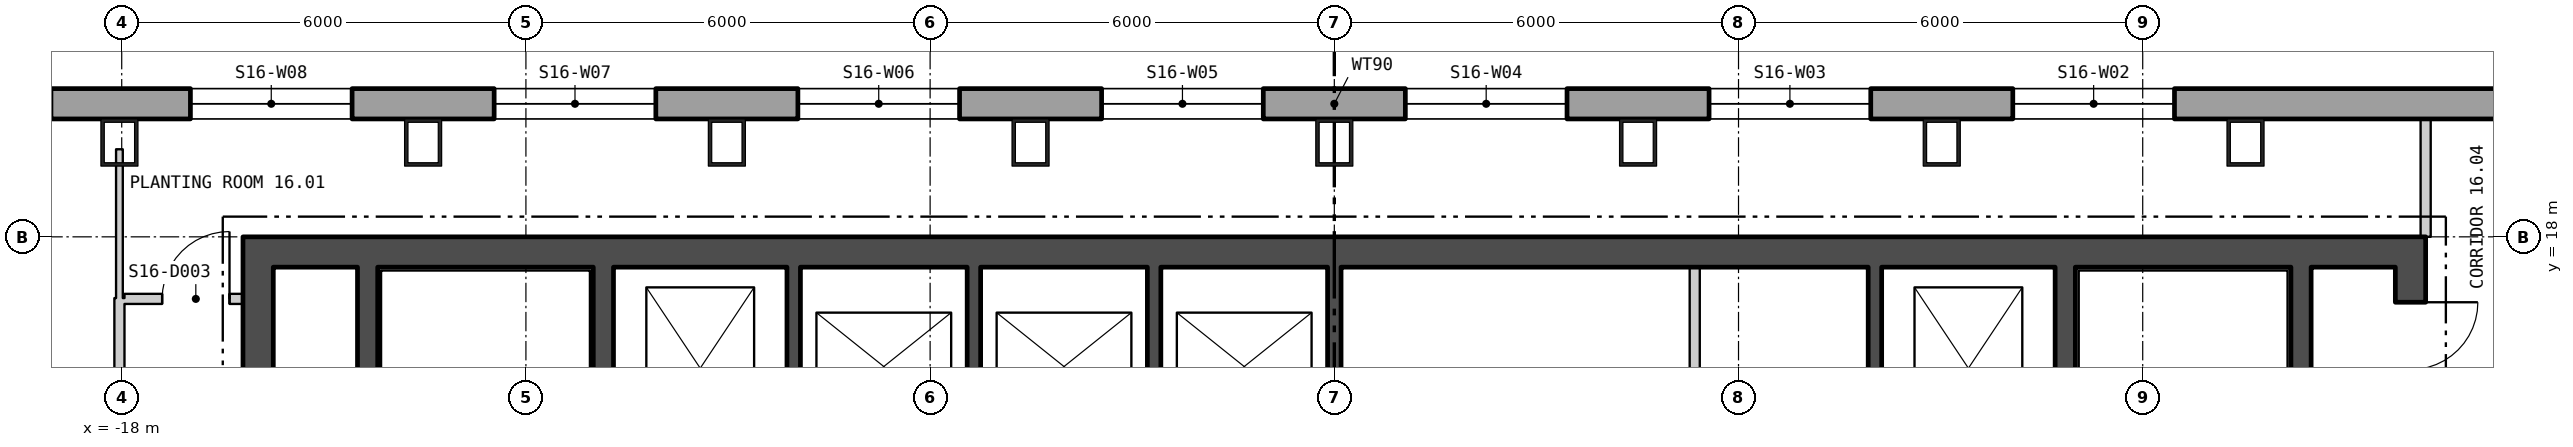
"""IFC4 building model, lengths in metres.
Left out: names, types, materials, properties, quantities, classifications, styles, units other than length and angle.
Written with IfcOpenShell. Run it as: python <this file> out.ifc"""

import sys

from ifc_helpers import new_model, si_unit, direction, frame, frame_2d, origin, origin_2d, place, context, subcontext, project, spatial, polyline, rectangle, hollow_rectangle, outline, extrude, element, fill, save


model = new_model("IFC4")
c1 = context("Model", 3, precision=1e-05, world=origin(), true_north=direction((0.0, 1.0)))
c2 = subcontext(c1, "Body", "Model", "MODEL_VIEW")
j1 = project(units=[si_unit("LENGTHUNIT", "METRE"), si_unit("PLANEANGLEUNIT", "RADIAN")], contexts=[c1])
p1 = place(None, origin())
s1 = spatial("IfcSite", under=j1, at=p1, CompositionType="ELEMENT")
p2 = place(p1, origin())
s2 = spatial("IfcBuilding", under=s1, at=p2, CompositionType="ELEMENT")
p3 = place(p2, frame((0.0, 0.0, 216.0)))
s3 = spatial("IfcBuildingStorey", under=s2, at=p3, CompositionType="ELEMENT", Elevation=216.0)
for number, where, z_axis, x_axis in (
    (1, (13.526, 19.4, 0.0), (0.0, 0.0, 1.0), (-1.0, 0.0, 0.0)),
    (2, (9.017, 19.4, 0.0), (0.0, 0.0, 1.0), (-1.0, 0.0, 0.0)),
    (3, (4.509, 19.4, 0.0), (0.0, 0.0, 1.0), (-1.0, 0.0, 0.0)),
    (4, (0.0, 19.4, 0.0), (0.0, 0.0, 1.0), (-1.0, 0.0, 0.0)),
    (5, (-4.509, 19.4, 0.0), (0.0, 0.0, 1.0), (-1.0, 0.0, 0.0)),
    (6, (-9.017, 19.4, 0.0), (0.0, 0.0, 1.0), (-1.0, 0.0, 0.0)),
    (7, (-13.526, 19.4, 0.0), (0.0, 0.0, 1.0), (-1.0, 0.0, 0.0)),
    (8, (-18.034, 19.4, 0.0), (0.0, 0.0, 1.0), (-1.0, 0.0, 0.0)),
):
    element("IfcColumn", number, at=place(p3, frame(where, z_axis=z_axis, x_axis=x_axis)), inside=s3, PredefinedType="COLUMN", context=c2, shape_type="SweptSolid", body=[
        extrude(hollow_rectangle(XDim=0.55, YDim=0.7, WallThickness=0.05, at=origin_2d()), origin(), (0.0, 0.0, 1.0), 3.9),
    ])
p4 = place(p3, frame((22.875, 19.975, -0.4), z_axis=(0.0, 0.0, 1.0), x_axis=(-1.0, 0.0, 0.0)))
e9 = element("IfcWall", 9, at=p4, inside=s3, PredefinedType="SOLIDWALL", context=c2, shape_type="SweptSolid", body=[
    extrude(outline(polyline([(-0.13, -0.225), (45.88, -0.225), (45.62, 0.225), (0.13, 0.225), (-0.13, -0.225)])), origin(), (0.0, 0.0, 1.0), 3.9),
])
p5 = place(p4, frame((1.425, 0.0, 1.3)))
e10 = element("IfcOpeningElement", 10, at=p5, cuts=e9, PredefinedType="OPENING", context=c2, shape_type="SweptSolid", body=[
    extrude(rectangle(XDim=2.4, YDim=2.0, at=frame_2d((1.2, 1.0))), frame((0.0, 0.235, 0.0), z_axis=(0.0, -1.0, 0.0), x_axis=(1.0, 0.0, 0.0)), (0.0, 0.0, 1.0), 0.47),
])
p6 = place(p4, frame((10.403, 0.0, 1.3)))
e11 = element("IfcOpeningElement", 11, at=p6, cuts=e9, PredefinedType="OPENING", context=c2, shape_type="SweptSolid", body=[
    extrude(rectangle(XDim=2.4, YDim=2.0, at=frame_2d((1.2, 1.0))), frame((0.0, 0.235, 0.0), z_axis=(0.0, -1.0, 0.0), x_axis=(1.0, 0.0, 0.0)), (0.0, 0.0, 1.0), 0.47),
])
p7 = place(p4, frame((14.912, 0.0, 1.3)))
e12 = element("IfcOpeningElement", 12, at=p7, cuts=e9, PredefinedType="OPENING", context=c2, shape_type="SweptSolid", body=[
    extrude(rectangle(XDim=2.4, YDim=2.0, at=frame_2d((1.2, 1.0))), frame((0.0, 0.235, 0.0), z_axis=(0.0, -1.0, 0.0), x_axis=(1.0, 0.0, 0.0)), (0.0, 0.0, 1.0), 0.47),
])
p8 = place(p4, frame((19.421, 0.0, 1.3)))
e13 = element("IfcOpeningElement", 13, at=p8, cuts=e9, PredefinedType="OPENING", context=c2, shape_type="SweptSolid", body=[
    extrude(rectangle(XDim=2.4, YDim=2.0, at=frame_2d((1.2, 1.0))), frame((0.0, 0.235, 0.0), z_axis=(0.0, -1.0, 0.0), x_axis=(1.0, 0.0, 0.0)), (0.0, 0.0, 1.0), 0.47),
])
p9 = place(p4, frame((23.929, 0.0, 1.3)))
e14 = element("IfcOpeningElement", 14, at=p9, cuts=e9, PredefinedType="OPENING", context=c2, shape_type="SweptSolid", body=[
    extrude(rectangle(XDim=2.4, YDim=2.0, at=frame_2d((1.2, 1.0))), frame((0.0, 0.235, 0.0), z_axis=(0.0, -1.0, 0.0), x_axis=(1.0, 0.0, 0.0)), (0.0, 0.0, 1.0), 0.47),
])
p10 = place(p4, frame((28.438, 0.0, 1.3)))
e15 = element("IfcOpeningElement", 15, at=p10, cuts=e9, PredefinedType="OPENING", context=c2, shape_type="SweptSolid", body=[
    extrude(rectangle(XDim=2.4, YDim=2.0, at=frame_2d((1.2, 1.0))), frame((0.0, 0.235, 0.0), z_axis=(0.0, -1.0, 0.0), x_axis=(1.0, 0.0, 0.0)), (0.0, 0.0, 1.0), 0.47),
])
p11 = place(p4, frame((32.947, 0.0, 1.3)))
e16 = element("IfcOpeningElement", 16, at=p11, cuts=e9, PredefinedType="OPENING", context=c2, shape_type="SweptSolid", body=[
    extrude(rectangle(XDim=2.4, YDim=2.0, at=frame_2d((1.2, 1.0))), frame((0.0, 0.235, 0.0), z_axis=(0.0, -1.0, 0.0), x_axis=(1.0, 0.0, 0.0)), (0.0, 0.0, 1.0), 0.47),
])
p12 = place(p4, frame((37.455, 0.0, 1.3)))
e17 = element("IfcOpeningElement", 17, at=p12, cuts=e9, PredefinedType="OPENING", context=c2, shape_type="SweptSolid", body=[
    extrude(rectangle(XDim=2.4, YDim=2.0, at=frame_2d((1.2, 1.0))), frame((0.0, 0.235, 0.0), z_axis=(0.0, -1.0, 0.0), x_axis=(1.0, 0.0, 0.0)), (0.0, 0.0, 1.0), 0.47),
])
p13 = place(p4, frame((41.925, 0.0, 1.3)))
e18 = element("IfcOpeningElement", 18, at=p13, cuts=e9, PredefinedType="OPENING", context=c2, shape_type="SweptSolid", body=[
    extrude(rectangle(XDim=2.4, YDim=2.0, at=frame_2d((1.2, 1.0))), frame((0.0, 0.235, 0.0), z_axis=(0.0, -1.0, 0.0), x_axis=(1.0, 0.0, 0.0)), (0.0, 0.0, 1.0), 0.47),
])
p14 = place(p3, frame((-16.2, 17.775, 0.0), z_axis=(0.0, 0.0, 1.0), x_axis=(1.0, 0.0, 0.0)))
e19 = element("IfcWall", 19, at=p14, inside=s3, PredefinedType="SHEAR", context=c2, shape_type="SweptSolid", body=[
    extrude(rectangle(XDim=32.4, YDim=0.45, at=frame_2d((16.2, 0.0))), origin(), (0.0, 0.0, 1.0), 3.7),
])
p15 = place(p3, frame((-15.975, 2.45, 0.0), z_axis=(0.0, 0.0, 1.0), x_axis=(0.0, 1.0, 0.0)))
e20 = element("IfcWall", 20, at=p15, inside=s3, PredefinedType="SHEAR", context=c2, shape_type="SweptSolid", body=[
    extrude(rectangle(XDim=15.1, YDim=0.45, at=frame_2d((7.55, 0.0))), origin(), (0.0, 0.0, 1.0), 3.7),
])
p16 = place(p15, frame((4.4, 0.0, 0.0)))
e21 = element("IfcOpeningElement", 21, at=p16, cuts=e20, PredefinedType="OPENING", context=c2, shape_type="SweptSolid", body=[
    extrude(rectangle(XDim=1.5, YDim=2.1, at=frame_2d((0.75, 1.05))), frame((0.0, 0.235, 0.0), z_axis=(0.0, -1.0, 0.0), x_axis=(1.0, 0.0, 0.0)), (0.0, 0.0, 1.0), 0.47),
])
p17 = place(p15, frame((0.4, 0.0, 0.0)))
e22 = element("IfcOpeningElement", 22, at=p17, cuts=e20, PredefinedType="OPENING", context=c2, shape_type="SweptSolid", body=[
    extrude(rectangle(XDim=0.9, YDim=2.1, at=frame_2d((0.45, 1.05))), frame((0.0, 0.235, 0.0), z_axis=(0.0, -1.0, 0.0), x_axis=(1.0, 0.0, 0.0)), (0.0, 0.0, 1.0), 0.47),
])
p18 = place(p15, frame((2.5, 0.0, 0.0)))
e23 = element("IfcOpeningElement", 23, at=p18, cuts=e20, PredefinedType="OPENING", context=c2, shape_type="SweptSolid", body=[
    extrude(rectangle(XDim=0.9, YDim=2.1, at=frame_2d((0.45, 1.05))), frame((0.0, 0.235, 0.0), z_axis=(0.0, -1.0, 0.0), x_axis=(1.0, 0.0, 0.0)), (0.0, 0.0, 1.0), 0.47),
])
p19 = place(p15, frame((6.475, 0.0, 0.0)))
e24 = element("IfcOpeningElement", 24, at=p19, cuts=e20, PredefinedType="OPENING", context=c2, shape_type="SweptSolid", body=[
    extrude(rectangle(XDim=1.0, YDim=2.1, at=frame_2d((0.5, 1.05))), frame((0.0, 0.235, 0.0), z_axis=(0.0, -1.0, 0.0), x_axis=(1.0, 0.0, 0.0)), (0.0, 0.0, 1.0), 0.47),
])
p20 = place(p15, frame((11.125, 0.0, 0.0)))
e25 = element("IfcOpeningElement", 25, at=p20, cuts=e20, PredefinedType="OPENING", context=c2, shape_type="SweptSolid", body=[
    extrude(rectangle(XDim=0.9, YDim=2.1, at=frame_2d((0.45, 1.05))), frame((0.0, 0.235, 0.0), z_axis=(0.0, -1.0, 0.0), x_axis=(1.0, 0.0, 0.0)), (0.0, 0.0, 1.0), 0.47),
])
p21 = place(p3, frame((15.975, 2.45, 0.0), z_axis=(0.0, 0.0, 1.0), x_axis=(0.0, 1.0, 0.0)))
e26 = element("IfcWall", 26, at=p21, inside=s3, PredefinedType="SHEAR", context=c2, shape_type="SweptSolid", body=[
    extrude(rectangle(XDim=15.1, YDim=0.45, at=frame_2d((7.55, 0.0))), origin(), (0.0, 0.0, 1.0), 3.7),
])
p22 = place(p21, frame((4.4, 0.0, 0.0)))
e27 = element("IfcOpeningElement", 27, at=p22, cuts=e26, PredefinedType="OPENING", context=c2, shape_type="SweptSolid", body=[
    extrude(rectangle(XDim=1.5, YDim=2.1, at=frame_2d((0.75, 1.05))), frame((0.0, 0.235, 0.0), z_axis=(0.0, -1.0, 0.0), x_axis=(1.0, 0.0, 0.0)), (0.0, 0.0, 1.0), 0.47),
])
p23 = place(p21, frame((0.85, 0.0, 0.0)))
e28 = element("IfcOpeningElement", 28, at=p23, cuts=e26, PredefinedType="OPENING", context=c2, shape_type="SweptSolid", body=[
    extrude(rectangle(XDim=0.9, YDim=2.1, at=frame_2d((0.45, 1.05))), frame((0.0, 0.235, 0.0), z_axis=(0.0, -1.0, 0.0), x_axis=(1.0, 0.0, 0.0)), (0.0, 0.0, 1.0), 0.47),
])
p24 = place(p21, frame((3.05, 0.0, 0.0)))
e29 = element("IfcOpeningElement", 29, at=p24, cuts=e26, PredefinedType="OPENING", context=c2, shape_type="SweptSolid", body=[
    extrude(rectangle(XDim=0.9, YDim=2.1, at=frame_2d((0.45, 1.05))), frame((0.0, 0.235, 0.0), z_axis=(0.0, -1.0, 0.0), x_axis=(1.0, 0.0, 0.0)), (0.0, 0.0, 1.0), 0.47),
])
p25 = place(p21, frame((9.029, 0.0, 0.0)))
e30 = element("IfcOpeningElement", 30, at=p25, cuts=e26, PredefinedType="OPENING", context=c2, shape_type="SweptSolid", body=[
    extrude(rectangle(XDim=0.9, YDim=2.1, at=frame_2d((0.45, 1.05))), frame((0.0, 0.235, 0.0), z_axis=(0.0, -1.0, 0.0), x_axis=(1.0, 0.0, 0.0)), (0.0, 0.0, 1.0), 0.47),
])
p26 = place(p21, frame((13.579, 0.0, 0.0)))
e31 = element("IfcOpeningElement", 31, at=p26, cuts=e26, PredefinedType="OPENING", context=c2, shape_type="SweptSolid", body=[
    extrude(rectangle(XDim=1.0, YDim=2.1, at=frame_2d((0.5, 1.05))), frame((0.0, 0.235, 0.0), z_axis=(0.0, -1.0, 0.0), x_axis=(1.0, 0.0, 0.0)), (0.0, 0.0, 1.0), 0.47),
])
p27 = place(p3, frame((-10.85, 2.45, 0.0), z_axis=(0.0, 0.0, 1.0), x_axis=(0.0, 1.0, 0.0)))
e32 = element("IfcWall", 32, at=p27, inside=s3, PredefinedType="SHEAR", context=c2, shape_type="SweptSolid", body=[
    extrude(rectangle(XDim=15.1, YDim=0.3, at=frame_2d((7.55, 0.0))), origin(), (0.0, 0.0, 1.0), 3.7),
])
p28 = place(p27, frame((3.525, 0.0, 0.0)))
e33 = element("IfcOpeningElement", 33, at=p28, cuts=e32, PredefinedType="OPENING", context=c2, shape_type="SweptSolid", body=[
    extrude(rectangle(XDim=1.25, YDim=2.1, at=frame_2d((0.625, 1.05))), frame((0.0, 0.16, 0.0), z_axis=(0.0, -1.0, 0.0), x_axis=(1.0, 0.0, 0.0)), (0.0, 0.0, 1.0), 0.32),
])
p29 = place(p27, frame((1.15, 0.0, 0.0)))
e34 = element("IfcOpeningElement", 34, at=p29, cuts=e32, PredefinedType="OPENING", context=c2, shape_type="SweptSolid", body=[
    extrude(rectangle(XDim=1.0, YDim=2.1, at=frame_2d((0.5, 1.05))), frame((0.0, 0.16, 0.0), z_axis=(0.0, -1.0, 0.0), x_axis=(1.0, 0.0, 0.0)), (0.0, 0.0, 1.0), 0.32),
])
p30 = place(p3, frame((-14.35, 2.45, 0.0), z_axis=(0.0, 0.0, 1.0), x_axis=(0.0, 1.0, 0.0)))
e35 = element("IfcWall", 35, at=p30, inside=s3, PredefinedType="SHEAR", context=c2, shape_type="SweptSolid", body=[
    extrude(rectangle(XDim=15.1, YDim=0.3, at=frame_2d((7.55, 0.0))), origin(), (0.0, 0.0, 1.0), 3.7),
])
p31 = place(p30, frame((4.4, 0.0, 0.0)))
e36 = element("IfcOpeningElement", 36, at=p31, cuts=e35, PredefinedType="OPENING", context=c2, shape_type="SweptSolid", body=[
    extrude(rectangle(XDim=1.5, YDim=2.1, at=frame_2d((0.75, 1.05))), frame((0.0, 0.16, 0.0), z_axis=(0.0, -1.0, 0.0), x_axis=(1.0, 0.0, 0.0)), (0.0, 0.0, 1.0), 0.32),
])
p32 = place(p3, frame((10.85, 2.45, 0.0), z_axis=(0.0, 0.0, 1.0), x_axis=(0.0, 1.0, 0.0)))
e37 = element("IfcWall", 37, at=p32, inside=s3, PredefinedType="SHEAR", context=c2, shape_type="SweptSolid", body=[
    extrude(rectangle(XDim=15.1, YDim=0.3, at=frame_2d((7.55, 0.0))), origin(), (0.0, 0.0, 1.0), 3.7),
])
p33 = place(p32, frame((3.525, 0.0, 0.0)))
e38 = element("IfcOpeningElement", 38, at=p33, cuts=e37, PredefinedType="OPENING", context=c2, shape_type="SweptSolid", body=[
    extrude(rectangle(XDim=1.25, YDim=2.1, at=frame_2d((0.625, 1.05))), frame((0.0, 0.16, 0.0), z_axis=(0.0, -1.0, 0.0), x_axis=(1.0, 0.0, 0.0)), (0.0, 0.0, 1.0), 0.32),
])
p34 = place(p32, frame((1.15, 0.0, 0.0)))
e39 = element("IfcOpeningElement", 39, at=p34, cuts=e37, PredefinedType="OPENING", context=c2, shape_type="SweptSolid", body=[
    extrude(rectangle(XDim=1.0, YDim=2.1, at=frame_2d((0.5, 1.05))), frame((0.0, 0.16, 0.0), z_axis=(0.0, -1.0, 0.0), x_axis=(1.0, 0.0, 0.0)), (0.0, 0.0, 1.0), 0.32),
])
p35 = place(p3, frame((14.35, 2.45, 0.0), z_axis=(0.0, 0.0, 1.0), x_axis=(0.0, 1.0, 0.0)))
e40 = element("IfcWall", 40, at=p35, inside=s3, PredefinedType="SHEAR", context=c2, shape_type="SweptSolid", body=[
    extrude(rectangle(XDim=15.1, YDim=0.3, at=frame_2d((7.55, 0.0))), origin(), (0.0, 0.0, 1.0), 3.7),
])
p36 = place(p35, frame((4.4, 0.0, 0.0)))
e41 = element("IfcOpeningElement", 41, at=p36, cuts=e40, PredefinedType="OPENING", context=c2, shape_type="SweptSolid", body=[
    extrude(rectangle(XDim=1.5, YDim=2.1, at=frame_2d((0.75, 1.05))), frame((0.0, 0.16, 0.0), z_axis=(0.0, -1.0, 0.0), x_axis=(1.0, 0.0, 0.0)), (0.0, 0.0, 1.0), 0.32),
])
for number, where, z_axis, x_axis in (
    (42, (-8.025, 14.7, 0.0), (0.0, 0.0, 1.0), (0.0, 1.0, 0.0)),
    (43, (-5.35, 14.7, 0.0), (0.0, 0.0, 1.0), (0.0, 1.0, 0.0)),
    (44, (-2.675, 14.7, 0.0), (0.0, 0.0, 1.0), (0.0, 1.0, 0.0)),
    (45, (0.0, 14.7, 0.0), (0.0, 0.0, 1.0), (0.0, 1.0, 0.0)),
):
    element("IfcWall", number, at=place(p3, frame(where, z_axis=z_axis, x_axis=x_axis)), inside=s3, PredefinedType="SHEAR", context=c2, shape_type="SweptSolid", body=[
        extrude(rectangle(XDim=2.85, YDim=0.2, at=frame_2d((1.425, 0.0))), origin(), (0.0, 0.0, 1.0), 3.7),
    ])
p37 = place(p3, frame((5.35, 14.7, 0.0), z_axis=(0.0, 0.0, 1.0), x_axis=(0.0, 1.0, 0.0)))
e46 = element("IfcWall", 46, at=p37, inside=s3, PredefinedType="PARTITIONING", context=c2, shape_type="SweptSolid", body=[
    extrude(rectangle(XDim=2.85, YDim=0.15, at=frame_2d((1.425, 0.0))), origin(), (0.0, 0.0, 1.0), 3.7),
])
p38 = place(p3, frame((8.025, 14.7, 0.0), z_axis=(0.0, 0.0, 1.0), x_axis=(0.0, 1.0, 0.0)))
e47 = element("IfcWall", 47, at=p38, inside=s3, PredefinedType="SHEAR", context=c2, shape_type="SweptSolid", body=[
    extrude(rectangle(XDim=2.85, YDim=0.2, at=frame_2d((1.425, 0.0))), origin(), (0.0, 0.0, 1.0), 3.7),
])
p39 = place(p3, frame((-18.034, 13.3, 0.0), z_axis=(0.0, 0.0, 1.0), x_axis=(0.0, 1.0, 0.0)))
e48 = element("IfcWall", 48, at=p39, inside=s3, PredefinedType="PARTITIONING", context=c2, shape_type="SweptSolid", body=[
    extrude(rectangle(XDim=3.791, YDim=0.15, at=frame_2d((1.895, 0.0))), origin(), (0.0, 0.0, 1.0), 3.7),
])
p40 = place(p39, frame((1.344, 0.0, 0.0)))
e49 = element("IfcOpeningElement", 49, at=p40, cuts=e48, PredefinedType="OPENING", context=c2, shape_type="SweptSolid", body=[
    extrude(rectangle(XDim=1.0, YDim=2.1, at=frame_2d((0.5, 1.05))), frame((0.0, 0.085, 0.0), z_axis=(0.0, -1.0, 0.0), x_axis=(1.0, 0.0, 0.0)), (0.0, 0.0, 1.0), 0.17),
])
p41 = place(p3, frame((-18.034, 17.091, 0.0), z_axis=(0.0, 0.0, 1.0), x_axis=(0.0, 1.0, 0.0)))
e50 = element("IfcWall", 50, at=p41, inside=s3, PredefinedType="PARTITIONING", context=c2, shape_type="SweptSolid", body=[
    extrude(rectangle(XDim=2.209, YDim=0.1, at=frame_2d((1.105, 0.0))), origin(), (0.0, 0.0, 1.0), 3.7),
])
p42 = place(p3, frame((-17.959, 17.079, 0.0), z_axis=(0.0, 0.0, 1.0), x_axis=(1.0, 0.0, 0.0)))
e51 = element("IfcWall", 51, at=p42, inside=s3, PredefinedType="PARTITIONING", context=c2, shape_type="SweptSolid", body=[
    extrude(rectangle(XDim=1.759, YDim=0.15, at=frame_2d((0.879, 0.0))), origin(), (0.0, 0.0, 1.0), 3.7),
])
p43 = place(p42, frame((0.559, 0.0, 0.0)))
e52 = element("IfcOpeningElement", 52, at=p43, cuts=e51, PredefinedType="OPENING", context=c2, shape_type="SweptSolid", body=[
    extrude(rectangle(XDim=1.0, YDim=2.1, at=frame_2d((0.5, 1.05))), frame((0.0, 0.085, 0.0), z_axis=(0.0, -1.0, 0.0), x_axis=(1.0, 0.0, 0.0)), (0.0, 0.0, 1.0), 0.17),
])
p44 = place(p3, frame((16.2, 18.0, 0.0), z_axis=(0.0, 0.0, 1.0), x_axis=(0.0, 1.0, 0.0)))
e53 = element("IfcWall", 53, at=p44, inside=s3, PredefinedType="PARTITIONING", context=c2, shape_type="SweptSolid", body=[
    extrude(rectangle(XDim=1.75, YDim=0.15, at=frame_2d((0.875, 0.0))), origin(), (0.0, 0.0, 1.0), 3.7),
])
p45 = place(p6, origin())
e54 = element("IfcWindow", 54, at=p45, inside=s3, PartitioningType="SINGLE_PANEL", PredefinedType="WINDOW", context=c2, shape_type="SweptSolid", body=[
    extrude(rectangle(XDim=2.4, YDim=2.0, at=frame_2d((1.2, 1.0))), frame((0.0, 0.105, 0.0), z_axis=(0.0, -1.0, 0.0), x_axis=(1.0, 0.0, 0.0)), (0.0, 0.0, 1.0), 0.06),
])
fill(e11, e54)
p46 = place(p7, origin())
e55 = element("IfcWindow", 55, at=p46, inside=s3, PartitioningType="SINGLE_PANEL", PredefinedType="WINDOW", context=c2, shape_type="SweptSolid", body=[
    extrude(rectangle(XDim=2.4, YDim=2.0, at=frame_2d((1.2, 1.0))), frame((0.0, 0.105, 0.0), z_axis=(0.0, -1.0, 0.0), x_axis=(1.0, 0.0, 0.0)), (0.0, 0.0, 1.0), 0.06),
])
fill(e12, e55)
p47 = place(p8, origin())
e56 = element("IfcWindow", 56, at=p47, inside=s3, PartitioningType="SINGLE_PANEL", PredefinedType="WINDOW", context=c2, shape_type="SweptSolid", body=[
    extrude(rectangle(XDim=2.4, YDim=2.0, at=frame_2d((1.2, 1.0))), frame((0.0, 0.105, 0.0), z_axis=(0.0, -1.0, 0.0), x_axis=(1.0, 0.0, 0.0)), (0.0, 0.0, 1.0), 0.06),
])
fill(e13, e56)
p48 = place(p9, origin())
e57 = element("IfcWindow", 57, at=p48, inside=s3, PartitioningType="SINGLE_PANEL", PredefinedType="WINDOW", context=c2, shape_type="SweptSolid", body=[
    extrude(rectangle(XDim=2.4, YDim=2.0, at=frame_2d((1.2, 1.0))), frame((0.0, 0.105, 0.0), z_axis=(0.0, -1.0, 0.0), x_axis=(1.0, 0.0, 0.0)), (0.0, 0.0, 1.0), 0.06),
])
fill(e14, e57)
p49 = place(p10, origin())
e58 = element("IfcWindow", 58, at=p49, inside=s3, PartitioningType="SINGLE_PANEL", PredefinedType="WINDOW", context=c2, shape_type="SweptSolid", body=[
    extrude(rectangle(XDim=2.4, YDim=2.0, at=frame_2d((1.2, 1.0))), frame((0.0, 0.105, 0.0), z_axis=(0.0, -1.0, 0.0), x_axis=(1.0, 0.0, 0.0)), (0.0, 0.0, 1.0), 0.06),
])
fill(e15, e58)
p50 = place(p11, origin())
e59 = element("IfcWindow", 59, at=p50, inside=s3, PartitioningType="SINGLE_PANEL", PredefinedType="WINDOW", context=c2, shape_type="SweptSolid", body=[
    extrude(rectangle(XDim=2.4, YDim=2.0, at=frame_2d((1.2, 1.0))), frame((0.0, 0.105, 0.0), z_axis=(0.0, -1.0, 0.0), x_axis=(1.0, 0.0, 0.0)), (0.0, 0.0, 1.0), 0.06),
])
fill(e16, e59)
p51 = place(p12, origin())
e60 = element("IfcWindow", 60, at=p51, inside=s3, PartitioningType="SINGLE_PANEL", PredefinedType="WINDOW", context=c2, shape_type="SweptSolid", body=[
    extrude(rectangle(XDim=2.4, YDim=2.0, at=frame_2d((1.2, 1.0))), frame((0.0, 0.105, 0.0), z_axis=(0.0, -1.0, 0.0), x_axis=(1.0, 0.0, 0.0)), (0.0, 0.0, 1.0), 0.06),
])
fill(e17, e60)
p52 = place(p26, origin())
e61 = element("IfcDoor", 61, at=p52, inside=s3, OperationType="SINGLE_SWING_RIGHT", PredefinedType="DOOR", context=c2, shape_type="SweptSolid", body=[
    extrude(rectangle(XDim=1.0, YDim=2.1, at=frame_2d((0.5, 1.05))), frame((0.0, 0.025, 0.0), z_axis=(0.0, -1.0, 0.0), x_axis=(1.0, 0.0, 0.0)), (0.0, 0.0, 1.0), 0.05),
])
fill(e31, e61)
p53 = place(p43, origin())
e62 = element("IfcDoor", 62, at=p53, inside=s3, OperationType="SINGLE_SWING_LEFT", PredefinedType="DOOR", context=c2, shape_type="SweptSolid", body=[
    extrude(rectangle(XDim=1.0, YDim=2.1, at=frame_2d((0.5, 1.05))), frame((0.0, 0.025, 0.0), z_axis=(0.0, -1.0, 0.0), x_axis=(1.0, 0.0, 0.0)), (0.0, 0.0, 1.0), 0.05),
])
fill(e52, e62)
save(model, sys.argv[1])
